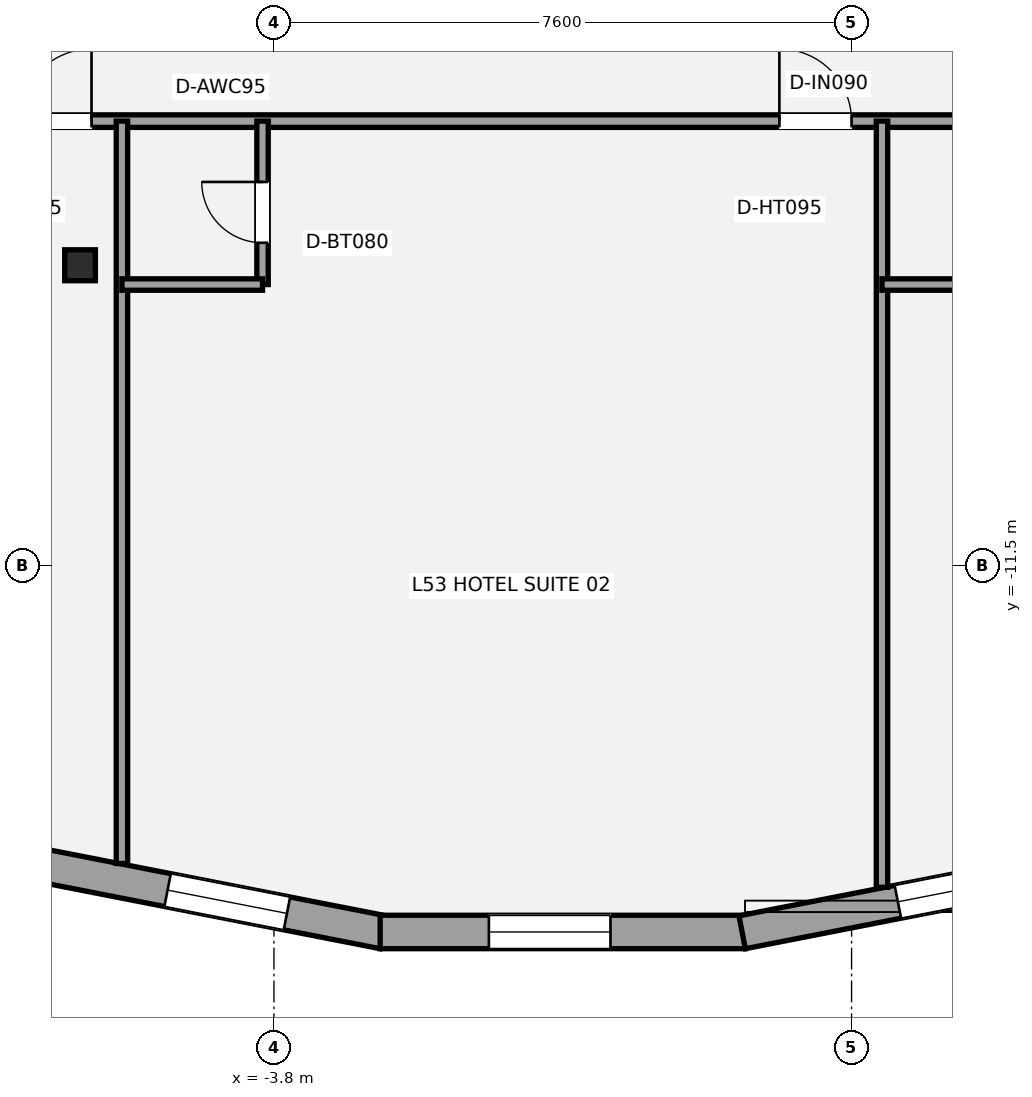
"""IFC4 building model, lengths in metres.
Left out: names, types, materials, properties, quantities, classifications, styles, units other than length and angle.
Written with IfcOpenShell. Run it as: python <this file> out.ifc"""

import sys

from ifc_helpers import new_model, si_unit, direction, frame, frame_2d, origin, origin_2d, place, context, subcontext, project, spatial, rectangle, i_section, extrude, element, fill, save


model = new_model("IFC4")
c1 = context("Model", 3, precision=1e-05, world=origin(), true_north=direction((0.0, 1.0)))
c2 = subcontext(c1, "Body", "Model", "MODEL_VIEW")
j1 = project(units=[si_unit("LENGTHUNIT", "METRE"), si_unit("PLANEANGLEUNIT", "RADIAN")], contexts=[c1])
p1 = place(None, origin())
s1 = spatial("IfcSite", under=j1, at=p1, CompositionType="ELEMENT")
p2 = place(p1, origin())
s2 = spatial("IfcBuilding", under=s1, at=p2, CompositionType="ELEMENT")
p3 = place(p2, frame((0.0, 0.0, 191.8)))
s3 = spatial("IfcBuildingStorey", under=s2, at=p3, CompositionType="ELEMENT", Elevation=191.8)
p4 = place(p3, frame((-6.351, -7.546, 0.0), z_axis=(0.0, 0.0, 1.0), x_axis=(1.0, 0.0, 0.0)))
e1 = element("IfcColumn", 1, at=p4, inside=s3, PredefinedType="COLUMN", context=c2, shape_type="SweptSolid", body=[
    extrude(i_section(OverallWidth=0.404, OverallDepth=0.407, WebThickness=0.027, FlangeThickness=0.044, at=origin_2d()), origin(), (0.0, 0.0, 1.0), 3.2),
])
p5 = place(p3, frame((-2.36, -16.322, 0.0), z_axis=(0.0, 0.0, 1.0), x_axis=(-0.981406109785, 0.191942823979, 0.0)))
e2 = element("IfcWall", 2, at=p5, inside=s3, PredefinedType="STANDARD", context=c2, shape_type="SweptSolid", body=[
    extrude(rectangle(XDim=4.682, YDim=0.44, at=frame_2d((2.341, 0.0))), origin(), (0.0, 0.0, 1.0), 2.315),
])
p6 = place(p5, frame((1.293, 0.0, 0.58)))
e3 = element("IfcOpeningElement", 3, at=p6, cuts=e2, PredefinedType="OPENING", context=c2, shape_type="SweptSolid", body=[
    extrude(rectangle(XDim=1.6, YDim=1.55, at=frame_2d((0.8, 0.775))), frame((0.0, 0.23, 0.0), z_axis=(0.0, -1.0, 0.0), x_axis=(1.0, 0.0, 0.0)), (0.0, 0.0, 1.0), 0.46),
])
p7 = place(p3, frame((2.403, -16.318, 0.0), z_axis=(0.0, 0.0, 1.0), x_axis=(-1.0, 0.0, 0.0)))
e4 = element("IfcWall", 4, at=p7, inside=s3, PredefinedType="STANDARD", context=c2, shape_type="SweptSolid", body=[
    extrude(rectangle(XDim=4.805, YDim=0.44, at=frame_2d((2.403, 0.0))), origin(), (0.0, 0.0, 1.0), 2.315),
])
p8 = place(p7, frame((1.775, 0.0, 0.58)))
e5 = element("IfcOpeningElement", 5, at=p8, cuts=e4, PredefinedType="OPENING", context=c2, shape_type="SweptSolid", body=[
    extrude(rectangle(XDim=1.6, YDim=1.55, at=frame_2d((0.8, 0.775))), frame((0.0, 0.23, 0.0), z_axis=(0.0, -1.0, 0.0), x_axis=(1.0, 0.0, 0.0)), (0.0, 0.0, 1.0), 0.46),
])
p9 = place(p3, frame((6.955, -15.423, 0.0), z_axis=(0.0, 0.0, 1.0), x_axis=(-0.981406109785, -0.191942823979, 0.0)))
e6 = element("IfcWall", 6, at=p9, inside=s3, PredefinedType="STANDARD", context=c2, shape_type="SweptSolid", body=[
    extrude(rectangle(XDim=4.682, YDim=0.44, at=frame_2d((2.341, 0.0))), origin(), (0.0, 0.0, 1.0), 2.315),
])
p10 = place(p9, frame((0.995, 0.0, 0.58)))
e7 = element("IfcOpeningElement", 7, at=p10, cuts=e6, PredefinedType="OPENING", context=c2, shape_type="SweptSolid", body=[
    extrude(rectangle(XDim=1.6, YDim=1.55, at=frame_2d((0.8, 0.775))), frame((0.0, 0.23, 0.0), z_axis=(0.0, -1.0, 0.0), x_axis=(1.0, 0.0, 0.0)), (0.0, 0.0, 1.0), 0.46),
])
p11 = place(p3, frame((-16.1, -5.65, 0.0), z_axis=(0.0, 0.0, 1.0), x_axis=(1.0, 0.0, 0.0)))
e8 = element("IfcWall", 8, at=p11, inside=s3, PredefinedType="PARTITIONING", context=c2, shape_type="SweptSolid", body=[
    extrude(rectangle(XDim=31.65, YDim=0.165, at=frame_2d((15.825, 0.0))), origin(), (0.0, 0.0, 1.0), 2.398),
])
p12 = place(p11, frame((8.95, 0.0, 0.0)))
e9 = element("IfcOpeningElement", 9, at=p12, cuts=e8, PredefinedType="OPENING", context=c2, shape_type="SweptSolid", body=[
    extrude(rectangle(XDim=0.95, YDim=2.15, at=frame_2d((0.475, 1.075))), frame((0.0, 0.093, 0.0), z_axis=(0.0, -1.0, 0.0), x_axis=(1.0, 0.0, 0.0)), (0.0, 0.0, 1.0), 0.185),
])
p13 = place(p11, frame((18.95, 0.0, 0.0)))
e10 = element("IfcOpeningElement", 10, at=p13, cuts=e8, PredefinedType="OPENING", context=c2, shape_type="SweptSolid", body=[
    extrude(rectangle(XDim=0.95, YDim=2.15, at=frame_2d((0.475, 1.075))), frame((0.0, 0.093, 0.0), z_axis=(0.0, -1.0, 0.0), x_axis=(1.0, 0.0, 0.0)), (0.0, 0.0, 1.0), 0.185),
])
p14 = place(p11, frame((30.3, 0.0, 0.0)))
e11 = element("IfcOpeningElement", 11, at=p14, cuts=e8, PredefinedType="OPENING", context=c2, shape_type="SweptSolid", body=[
    extrude(rectangle(XDim=0.95, YDim=2.15, at=frame_2d((0.475, 1.075))), frame((0.0, 0.093, 0.0), z_axis=(0.0, -1.0, 0.0), x_axis=(1.0, 0.0, 0.0)), (0.0, 0.0, 1.0), 0.185),
])
p15 = place(p3, frame((-5.8, -15.417, 0.0), z_axis=(0.0, 0.0, 1.0), x_axis=(0.0, 1.0, 0.0)))
e12 = element("IfcWall", 12, at=p15, inside=s3, PredefinedType="PLUMBINGWALL", context=c2, shape_type="SweptSolid", body=[
    extrude(rectangle(XDim=9.767, YDim=0.15, at=frame_2d((4.883, 0.0))), origin(), (0.0, 0.0, 1.0), 2.473),
])
p16 = place(p3, frame((4.2, -15.729, 0.0), z_axis=(0.0, 0.0, 1.0), x_axis=(0.0, 1.0, 0.0)))
e13 = element("IfcWall", 13, at=p16, inside=s3, PredefinedType="PLUMBINGWALL", context=c2, shape_type="SweptSolid", body=[
    extrude(rectangle(XDim=10.08, YDim=0.15, at=frame_2d((5.04, 0.0))), origin(), (0.0, 0.0, 1.0), 2.473),
])
p17 = place(p3, frame((-3.95, -7.8, 0.0), z_axis=(0.0, 0.0, 1.0), x_axis=(0.0, 1.0, 0.0)))
e14 = element("IfcWall", 14, at=p17, inside=s3, PredefinedType="PLUMBINGWALL", context=c2, shape_type="SweptSolid", body=[
    extrude(rectangle(XDim=2.15, YDim=0.15, at=frame_2d((1.075, 0.0))), origin(), (0.0, 0.0, 1.0), 2.473),
])
p18 = place(p17, frame((0.55, 0.0, 0.0)))
e15 = element("IfcOpeningElement", 15, at=p18, cuts=e14, PredefinedType="OPENING", context=c2, shape_type="SweptSolid", body=[
    extrude(rectangle(XDim=0.8, YDim=2.1, at=frame_2d((0.4, 1.05))), frame((0.0, 0.085, 0.0), z_axis=(0.0, -1.0, 0.0), x_axis=(1.0, 0.0, 0.0)), (0.0, 0.0, 1.0), 0.17),
])
for number, where, z_axis, x_axis in (
    (16, (-5.8, -7.8, 0.0), (0.0, 0.0, 1.0), (1.0, 0.0, 0.0)),
    (17, (4.2, -7.8, 0.0), (0.0, 0.0, 1.0), (1.0, 0.0, 0.0)),
):
    element("IfcWall", number, at=place(p3, frame(where, z_axis=z_axis, x_axis=x_axis)), inside=s3, PredefinedType="PLUMBINGWALL", context=c2, shape_type="SweptSolid", body=[
        extrude(rectangle(XDim=1.85, YDim=0.15, at=frame_2d((0.925, 0.0))), origin(), (0.0, 0.0, 1.0), 3.02),
    ])
p19 = place(p6, origin())
e18 = element("IfcWindow", 18, at=p19, inside=s3, PartitioningType="SINGLE_PANEL", PredefinedType="WINDOW", context=c2, shape_type="SweptSolid", body=[
    extrude(rectangle(XDim=1.6, YDim=1.55, at=frame_2d((0.8, 0.775))), frame((0.0, -0.01, 0.0), z_axis=(0.0, -1.0, 0.0), x_axis=(1.0, 0.0, 0.0)), (0.0, 0.0, 1.0), 0.06),
])
fill(e3, e18)
p20 = place(p8, origin())
e19 = element("IfcWindow", 19, at=p20, inside=s3, PartitioningType="SINGLE_PANEL", PredefinedType="WINDOW", context=c2, shape_type="SweptSolid", body=[
    extrude(rectangle(XDim=1.6, YDim=1.55, at=frame_2d((0.8, 0.775))), frame((0.0, -0.01, 0.0), z_axis=(0.0, -1.0, 0.0), x_axis=(1.0, 0.0, 0.0)), (0.0, 0.0, 1.0), 0.06),
])
fill(e5, e19)
p21 = place(p10, origin())
e20 = element("IfcWindow", 20, at=p21, inside=s3, PartitioningType="SINGLE_PANEL", PredefinedType="WINDOW", context=c2, shape_type="SweptSolid", body=[
    extrude(rectangle(XDim=1.6, YDim=1.55, at=frame_2d((0.8, 0.775))), frame((0.0, -0.01, 0.0), z_axis=(0.0, -1.0, 0.0), x_axis=(1.0, 0.0, 0.0)), (0.0, 0.0, 1.0), 0.06),
])
fill(e7, e20)
p22 = place(p12, origin())
e21 = element("IfcDoor", 21, at=p22, inside=s3, OperationType="SINGLE_SWING_RIGHT", PredefinedType="DOOR", context=c2, shape_type="SweptSolid", body=[
    extrude(rectangle(XDim=0.95, YDim=2.15, at=frame_2d((0.475, 1.075))), frame((0.0, 0.025, 0.0), z_axis=(0.0, -1.0, 0.0), x_axis=(1.0, 0.0, 0.0)), (0.0, 0.0, 1.0), 0.05),
])
fill(e9, e21)
p23 = place(p13, origin())
e22 = element("IfcDoor", 22, at=p23, inside=s3, OperationType="SINGLE_SWING_LEFT", PredefinedType="DOOR", context=c2, shape_type="SweptSolid", body=[
    extrude(rectangle(XDim=0.95, YDim=2.15, at=frame_2d((0.475, 1.075))), frame((0.0, 0.025, 0.0), z_axis=(0.0, -1.0, 0.0), x_axis=(1.0, 0.0, 0.0)), (0.0, 0.0, 1.0), 0.05),
])
fill(e10, e22)
p24 = place(p18, origin())
e23 = element("IfcDoor", 23, at=p24, inside=s3, OperationType="SINGLE_SWING_RIGHT", PredefinedType="DOOR", context=c2, shape_type="SweptSolid", body=[
    extrude(rectangle(XDim=0.8, YDim=2.1, at=frame_2d((0.4, 1.05))), frame((0.0, 0.025, 0.0), z_axis=(0.0, -1.0, 0.0), x_axis=(1.0, 0.0, 0.0)), (0.0, 0.0, 1.0), 0.05),
])
fill(e15, e23)
save(model, sys.argv[1])
